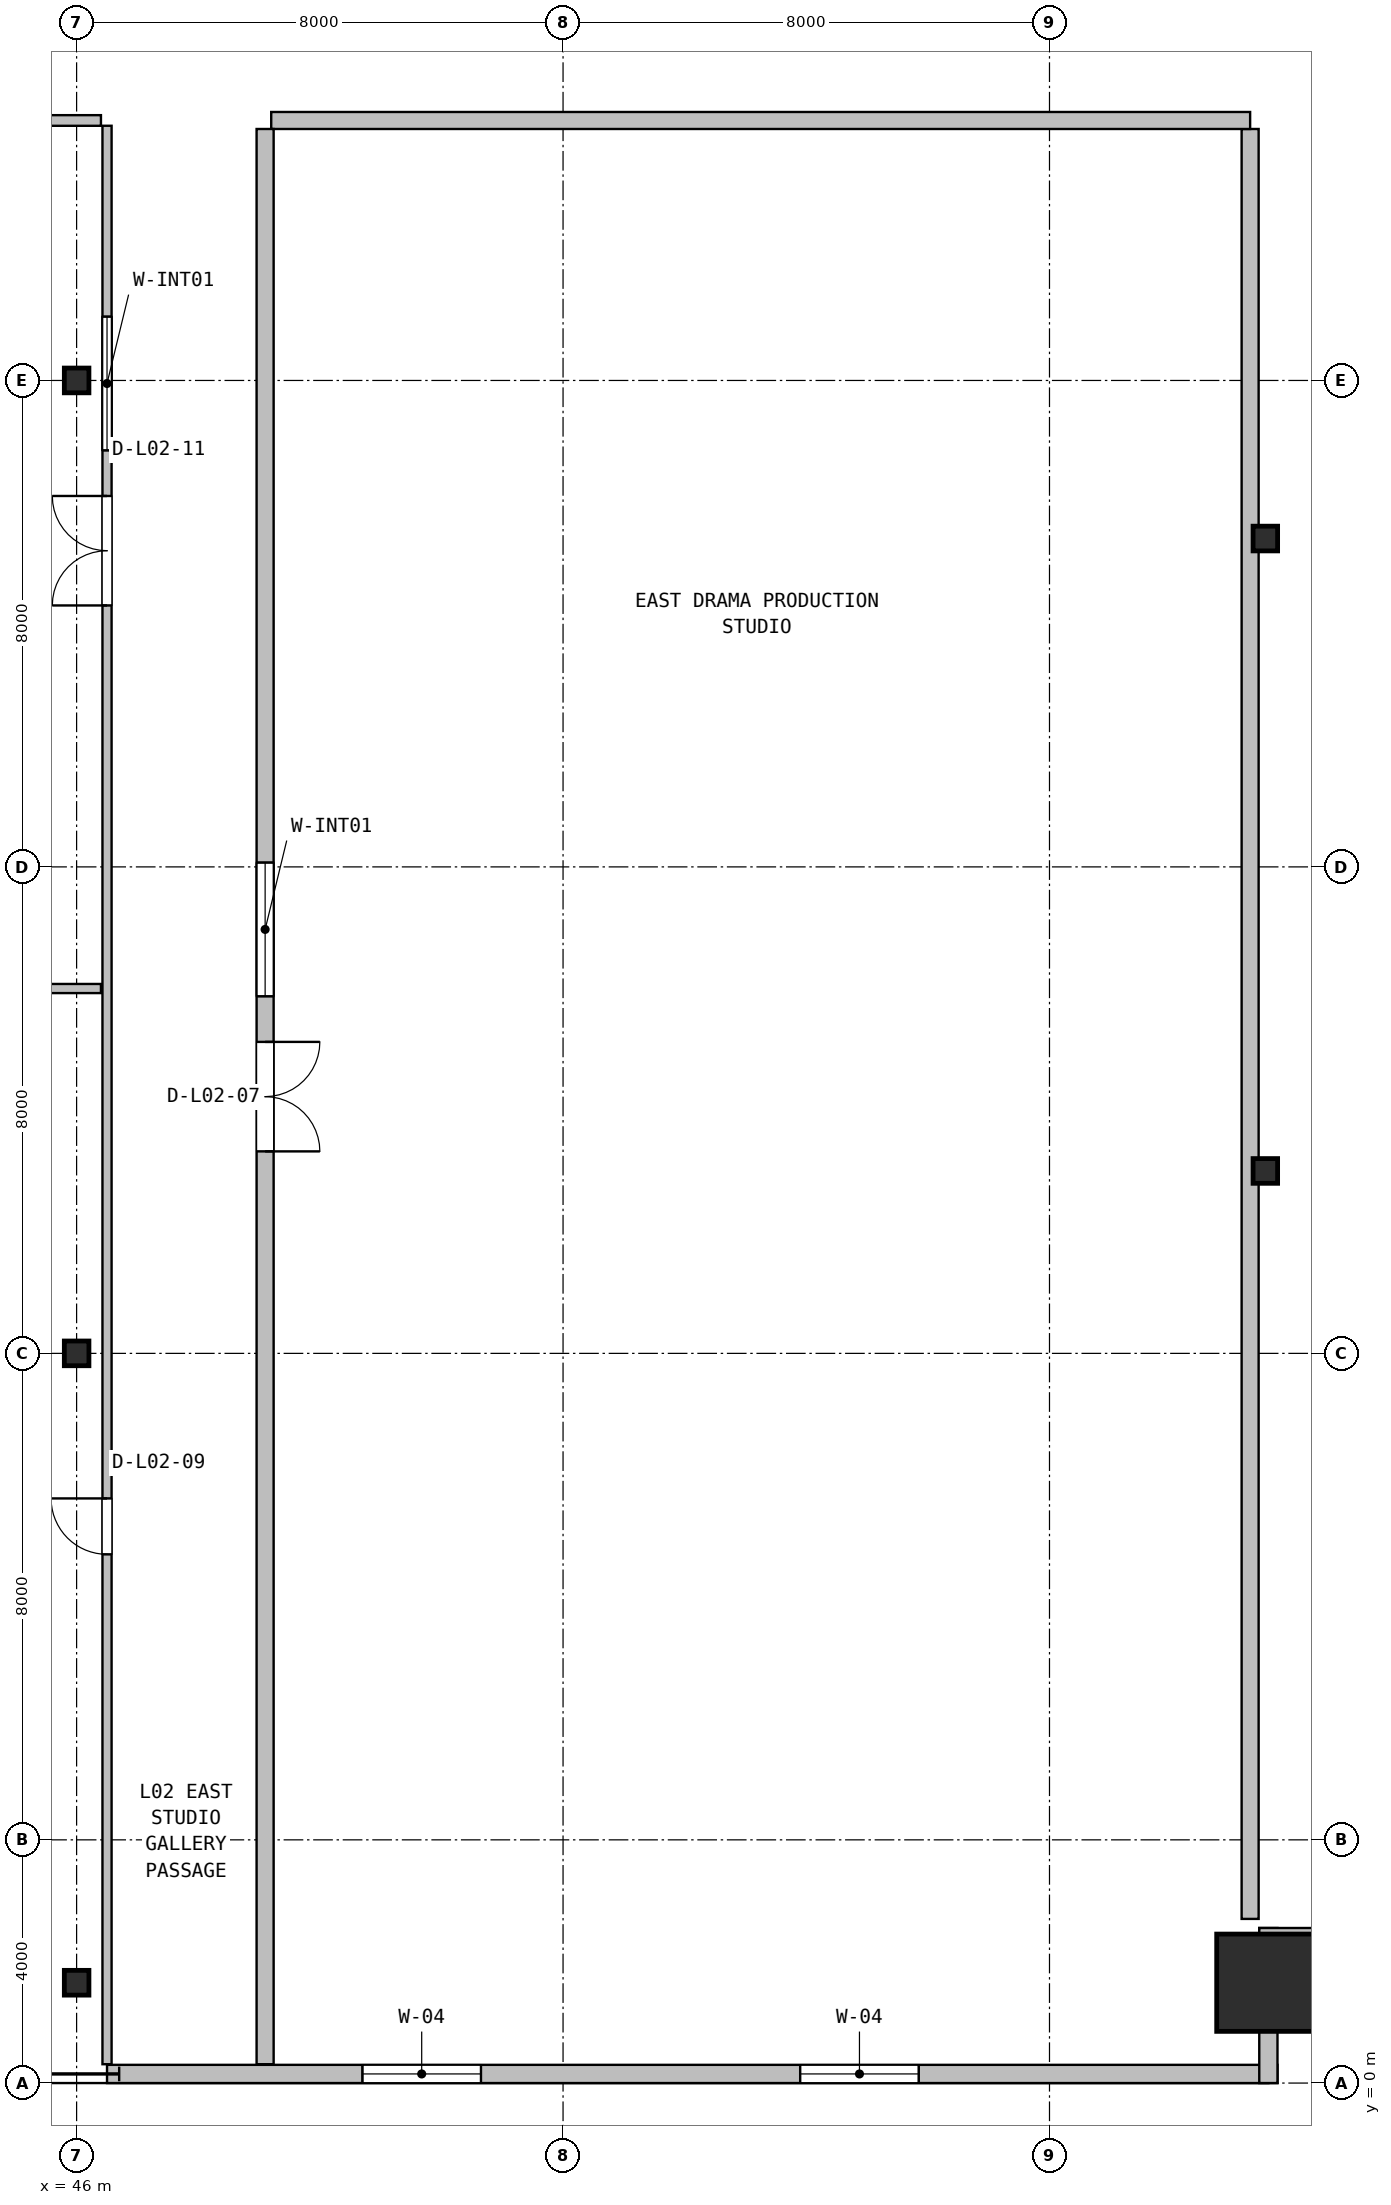
"""IFC4 building model, lengths in metres.
Left out: names, types, materials, properties, quantities, classifications, styles, units other than length and angle.
Written with IfcOpenShell. Run it as: python <this file> out.ifc"""

import sys

from ifc_helpers import new_model, si_unit, direction, frame, frame_2d, origin, origin_2d, place, context, subcontext, project, spatial, rectangle, hollow_rectangle, i_section, extrude, source, transform, mapped, element, fill, save


model = new_model("IFC4")
c1 = context("Model", 3, precision=1e-05, world=origin(), true_north=direction((0.0, 1.0)))
c2 = subcontext(c1, "Body", "Model", "MODEL_VIEW")
j1 = project(units=[si_unit("LENGTHUNIT", "METRE"), si_unit("PLANEANGLEUNIT", "RADIAN")], contexts=[c1])
p1 = place(None, origin())
s1 = spatial("IfcSite", under=j1, at=p1, CompositionType="ELEMENT")
p2 = place(p1, origin())
s2 = spatial("IfcBuilding", under=s1, at=p2, CompositionType="ELEMENT")
p3 = place(p2, frame((0.0, 0.0, 11.4)))
s3 = spatial("IfcBuildingStorey", under=s2, at=p3, CompositionType="ELEMENT", Elevation=11.4)
m1 = source(origin(), c2, "Body", "SweptSolid", [
    extrude(hollow_rectangle(XDim=1.6, YDim=1.6, WallThickness=0.06, at=origin_2d()), origin(), (0.0, 0.0, 1.0), 5.4),
])
p4 = place(p3, frame((65.55, 1.65, 0.0), z_axis=(0.0, 0.0, 1.0), x_axis=(1.0, 0.0, 0.0)))
e1 = element("IfcColumn", 1, at=p4, inside=s3, PredefinedType="COLUMN", context=c2, shape_type="MappedRepresentation", body=[
    mapped(m1, transform((0.0, 0.0, 0.0), x_axis=(1.0, 0.0, 0.0), y_axis=(0.0, 1.0, 0.0), z_axis=(0.0, 0.0, 1.0), scale=1.0)),
])
m2 = source(origin(), c2, "Body", "SweptSolid", [
    extrude(i_section(OverallWidth=0.404, OverallDepth=0.407, WebThickness=0.027, FlangeThickness=0.044, FilletRadius=0.018, at=origin_2d()), origin(), (0.0, 0.0, 1.0), 5.4),
])
for number, where, z_axis, x_axis in (
    (2, (46.0, 1.65, 0.0), (0.0, 0.0, 1.0), (1.0, 0.0, 0.0)),
    (3, (46.0, 12.0, 0.0), (0.0, 0.0, 1.0), (1.0, 0.0, 0.0)),
    (4, (46.0, 28.0, 0.0), (0.0, 0.0, 1.0), (1.0, 0.0, 0.0)),
    (5, (65.55, 15.0, 0.0), (0.0, 0.0, 1.0), (1.0, 0.0, 0.0)),
    (6, (65.55, 25.4, 0.0), (0.0, 0.0, 1.0), (1.0, 0.0, 0.0)),
):
    element("IfcColumn", number, at=place(p3, frame(where, z_axis=z_axis, x_axis=x_axis)), inside=s3, PredefinedType="COLUMN", context=c2, shape_type="MappedRepresentation", body=[
        mapped(m2, transform((0.0, 0.0, 0.0), x_axis=(1.0, 0.0, 0.0), y_axis=(0.0, 1.0, 0.0), z_axis=(0.0, 0.0, 1.0), scale=1.0)),
    ])
p5 = place(p3, frame((46.5, 0.15, 0.0), z_axis=(0.0, 0.0, 1.0), x_axis=(1.0, 0.0, 0.0)))
e7 = element("IfcWall", 7, at=p5, inside=s3, PredefinedType="SOLIDWALL", context=c2, shape_type="SweptSolid", body=[
    extrude(rectangle(XDim=19.25, YDim=0.3, at=frame_2d((9.625, 0.0))), origin(), (0.0, 0.0, 1.0), 5.1),
])
p6 = place(p5, frame((4.2, 0.0, 0.9)))
e8 = element("IfcOpeningElement", 8, at=p6, cuts=e7, PredefinedType="OPENING", context=c2, shape_type="SweptSolid", body=[
    extrude(rectangle(XDim=1.95, YDim=1.95, at=frame_2d((0.975, 0.975))), frame((0.0, 0.16, 0.0), z_axis=(0.0, -1.0, 0.0), x_axis=(1.0, 0.0, 0.0)), (0.0, 0.0, 1.0), 0.32),
])
p7 = place(p5, frame((11.4, 0.0, 0.9)))
e9 = element("IfcOpeningElement", 9, at=p7, cuts=e7, PredefinedType="OPENING", context=c2, shape_type="SweptSolid", body=[
    extrude(rectangle(XDim=1.95, YDim=1.95, at=frame_2d((0.975, 0.975))), frame((0.0, 0.16, 0.0), z_axis=(0.0, -1.0, 0.0), x_axis=(1.0, 0.0, 0.0)), (0.0, 0.0, 1.0), 0.32),
])
for number, where, z_axis, x_axis in (
    (10, (65.6, 0.0, 0.0), (0.0, 0.0, 1.0), (0.0, 1.0, 0.0)),
    (11, (65.45, 2.4, 0.0), (0.0, 0.0, 1.0), (1.0, 0.0, 0.0)),
):
    element("IfcWall", number, at=place(p3, frame(where, z_axis=z_axis, x_axis=x_axis)), inside=s3, PredefinedType="SOLIDWALL", context=c2, shape_type="SweptSolid", body=[
        extrude(rectangle(XDim=2.55, YDim=0.3, at=frame_2d((1.275, 0.0))), origin(), (0.0, 0.0, 1.0), 4.183),
    ])
p8 = place(p3, frame((65.3, 2.7, 0.0), z_axis=(0.0, 0.0, 1.0), x_axis=(0.0, 1.0, 0.0)))
e12 = element("IfcWall", 12, at=p8, inside=s3, PredefinedType="SOLIDWALL", context=c2, shape_type="SweptSolid", body=[
    extrude(rectangle(XDim=29.435, YDim=0.28, at=frame_2d((14.718, 0.0))), origin(), (0.0, 0.0, 1.0), 4.183),
])
p9 = place(p3, frame((49.2, 32.275, 0.0), z_axis=(0.0, 0.0, 1.0), x_axis=(1.0, 0.0, 0.0)))
e13 = element("IfcWall", 13, at=p9, inside=s3, PredefinedType="SOLIDWALL", context=c2, shape_type="SweptSolid", body=[
    extrude(rectangle(XDim=16.1, YDim=0.28, at=frame_2d((8.05, 0.0))), origin(), (0.0, 0.0, 1.0), 5.1),
])
p10 = place(p3, frame((49.1, 0.31, 0.0), z_axis=(0.0, 0.0, 1.0), x_axis=(0.0, 1.0, 0.0)))
e14 = element("IfcWall", 14, at=p10, inside=s3, PredefinedType="SOLIDWALL", context=c2, shape_type="SweptSolid", body=[
    extrude(rectangle(XDim=31.825, YDim=0.28, at=frame_2d((15.913, 0.0))), origin(), (0.0, 0.0, 1.0), 4.183),
])
p11 = place(p10, frame((15.012, 0.0, 0.0)))
e15 = element("IfcOpeningElement", 15, at=p11, cuts=e14, PredefinedType="OPENING", context=c2, shape_type="SweptSolid", body=[
    extrude(rectangle(XDim=1.8, YDim=2.25, at=frame_2d((0.9, 1.125))), frame((0.0, 0.15, 0.0), z_axis=(0.0, -1.0, 0.0), x_axis=(1.0, 0.0, 0.0)), (0.0, 0.0, 1.0), 0.3),
])
p12 = place(p10, frame((17.562, 0.0, 0.95)))
e16 = element("IfcOpeningElement", 16, at=p12, cuts=e14, PredefinedType="OPENING", context=c2, shape_type="SweptSolid", body=[
    extrude(rectangle(XDim=2.2, YDim=1.3, at=frame_2d((1.1, 0.65))), frame((0.0, 0.15, 0.0), z_axis=(0.0, -1.0, 0.0), x_axis=(1.0, 0.0, 0.0)), (0.0, 0.0, 1.0), 0.3),
])
p13 = place(p3, frame((21.6, 18.0, 0.0), z_axis=(0.0, 0.0, 1.0), x_axis=(1.0, 0.0, 0.0)))
e17 = element("IfcWall", 17, at=p13, inside=s3, PredefinedType="PARTITIONING", context=c2, shape_type="SweptSolid", body=[
    extrude(rectangle(XDim=24.8, YDim=0.15, at=frame_2d((12.4, 0.0))), origin(), (0.0, 0.0, 1.0), 4.183),
])
p14 = place(p3, frame((46.5, 0.31, 0.0), z_axis=(0.0, 0.0, 1.0), x_axis=(0.0, 1.0, 0.0)))
e18 = element("IfcWall", 18, at=p14, inside=s3, PredefinedType="PARTITIONING", context=c2, shape_type="SweptSolid", body=[
    extrude(rectangle(XDim=31.878, YDim=0.15, at=frame_2d((15.939, 0.0))), origin(), (0.0, 0.0, 1.0), 4.183),
])
p15 = place(p14, frame((8.385, 0.0, 0.0)))
e19 = element("IfcOpeningElement", 19, at=p15, cuts=e18, PredefinedType="OPENING", context=c2, shape_type="SweptSolid", body=[
    extrude(rectangle(XDim=0.92, YDim=2.08, at=frame_2d((0.46, 1.04))), frame((0.0, 0.085, 0.0), z_axis=(0.0, -1.0, 0.0), x_axis=(1.0, 0.0, 0.0)), (0.0, 0.0, 1.0), 0.17),
])
p16 = place(p14, frame((23.99, 0.0, 0.0)))
e20 = element("IfcOpeningElement", 20, at=p16, cuts=e18, PredefinedType="OPENING", context=c2, shape_type="SweptSolid", body=[
    extrude(rectangle(XDim=1.8, YDim=2.25, at=frame_2d((0.9, 1.125))), frame((0.0, 0.085, 0.0), z_axis=(0.0, -1.0, 0.0), x_axis=(1.0, 0.0, 0.0)), (0.0, 0.0, 1.0), 0.17),
])
p17 = place(p14, frame((26.54, 0.0, 0.95)))
e21 = element("IfcOpeningElement", 21, at=p17, cuts=e18, PredefinedType="OPENING", context=c2, shape_type="SweptSolid", body=[
    extrude(rectangle(XDim=2.2, YDim=1.3, at=frame_2d((1.1, 0.65))), frame((0.0, 0.085, 0.0), z_axis=(0.0, -1.0, 0.0), x_axis=(1.0, 0.0, 0.0)), (0.0, 0.0, 1.0), 0.17),
])
p18 = place(p3, frame((21.6, 32.275, 0.0), z_axis=(0.0, 0.0, 1.0), x_axis=(1.0, 0.0, 0.0)))
e22 = element("IfcWall", 22, at=p18, inside=s3, PredefinedType="PARTITIONING", context=c2, shape_type="SweptSolid", body=[
    extrude(rectangle(XDim=24.8, YDim=0.175, at=frame_2d((12.4, 0.0))), origin(), (0.0, 0.0, 1.0), 4.183),
])
p19 = place(p18, frame((6.775, 0.0, 0.0)))
e23 = element("IfcOpeningElement", 23, at=p19, cuts=e22, PredefinedType="OPENING", context=c2, shape_type="SweptSolid", body=[
    extrude(rectangle(XDim=1.05, YDim=2.1, at=frame_2d((0.525, 1.05))), frame((0.0, 0.098, 0.0), z_axis=(0.0, -1.0, 0.0), x_axis=(1.0, 0.0, 0.0)), (0.0, 0.0, 1.0), 0.195),
])
m3 = source(origin(), c2, "Body", "SweptSolid", [
    extrude(rectangle(XDim=1.95, YDim=1.95, at=frame_2d((0.975, 0.975))), frame((0.0, 0.03, 0.0), z_axis=(0.0, -1.0, 0.0), x_axis=(1.0, 0.0, 0.0)), (0.0, 0.0, 1.0), 0.06),
])
p20 = place(p6, origin())
e24 = element("IfcWindow", 24, at=p20, inside=s3, PartitioningType="SINGLE_PANEL", PredefinedType="WINDOW", context=c2, shape_type="MappedRepresentation", body=[
    mapped(m3, transform((0.0, 0.0, 0.0), x_axis=(1.0, 0.0, 0.0), y_axis=(0.0, 1.0, 0.0), z_axis=(0.0, 0.0, 1.0), scale=1.0)),
])
fill(e8, e24)
p21 = place(p7, origin())
e25 = element("IfcWindow", 25, at=p21, inside=s3, PartitioningType="SINGLE_PANEL", PredefinedType="WINDOW", context=c2, shape_type="MappedRepresentation", body=[
    mapped(m3, transform((0.0, 0.0, 0.0), x_axis=(1.0, 0.0, 0.0), y_axis=(0.0, 1.0, 0.0), z_axis=(0.0, 0.0, 1.0), scale=1.0)),
])
fill(e9, e25)
m4 = source(origin(), c2, "Body", "SweptSolid", [
    extrude(rectangle(XDim=1.8, YDim=2.25, at=frame_2d((0.9, 1.125))), frame((0.0, 0.025, 0.0), z_axis=(0.0, -1.0, 0.0), x_axis=(1.0, 0.0, 0.0)), (0.0, 0.0, 1.0), 0.05),
])
p22 = place(p11, frame((1.8, 0.0, 0.0), z_axis=(0.0, 0.0, 1.0), x_axis=(-1.0, 0.0, 0.0)))
e26 = element("IfcDoor", 26, at=p22, inside=s3, OperationType="DOUBLE_DOOR_SINGLE_SWING", PredefinedType="DOOR", context=c2, shape_type="MappedRepresentation", body=[
    mapped(m4, transform((0.0, 0.0, 0.0), x_axis=(1.0, 0.0, 0.0), y_axis=(0.0, 1.0, 0.0), z_axis=(0.0, 0.0, 1.0), scale=1.0)),
])
fill(e15, e26)
m5 = source(origin(), c2, "Body", "SweptSolid", [
    extrude(rectangle(XDim=2.2, YDim=1.3, at=frame_2d((1.1, 0.65))), frame((0.0, 0.03, 0.0), z_axis=(0.0, -1.0, 0.0), x_axis=(1.0, 0.0, 0.0)), (0.0, 0.0, 1.0), 0.06),
])
p23 = place(p12, origin())
e27 = element("IfcWindow", 27, at=p23, inside=s3, PartitioningType="SINGLE_PANEL", PredefinedType="WINDOW", context=c2, shape_type="MappedRepresentation", body=[
    mapped(m5, transform((0.0, 0.0, 0.0), x_axis=(1.0, 0.0, 0.0), y_axis=(0.0, 1.0, 0.0), z_axis=(0.0, 0.0, 1.0), scale=1.0)),
])
fill(e16, e27)
m6 = source(origin(), c2, "Body", "SweptSolid", [
    extrude(rectangle(XDim=0.92, YDim=2.08, at=frame_2d((0.46, 1.04))), frame((0.0, 0.025, 0.0), z_axis=(0.0, -1.0, 0.0), x_axis=(1.0, 0.0, 0.0)), (0.0, 0.0, 1.0), 0.05),
])
p24 = place(p15, origin())
e28 = element("IfcDoor", 28, at=p24, inside=s3, OperationType="SINGLE_SWING_RIGHT", PredefinedType="DOOR", context=c2, shape_type="MappedRepresentation", body=[
    mapped(m6, transform((0.0, 0.0, 0.0), x_axis=(1.0, 0.0, 0.0), y_axis=(0.0, 1.0, 0.0), z_axis=(0.0, 0.0, 1.0), scale=1.0)),
])
fill(e19, e28)
p25 = place(p16, origin())
e29 = element("IfcDoor", 29, at=p25, inside=s3, OperationType="DOUBLE_DOOR_SINGLE_SWING", PredefinedType="DOOR", context=c2, shape_type="MappedRepresentation", body=[
    mapped(m4, transform((0.0, 0.0, 0.0), x_axis=(1.0, 0.0, 0.0), y_axis=(0.0, 1.0, 0.0), z_axis=(0.0, 0.0, 1.0), scale=1.0)),
])
fill(e20, e29)
p26 = place(p17, origin())
e30 = element("IfcWindow", 30, at=p26, inside=s3, PartitioningType="SINGLE_PANEL", PredefinedType="WINDOW", context=c2, shape_type="MappedRepresentation", body=[
    mapped(m5, transform((0.0, 0.0, 0.0), x_axis=(1.0, 0.0, 0.0), y_axis=(0.0, 1.0, 0.0), z_axis=(0.0, 0.0, 1.0), scale=1.0)),
])
fill(e21, e30)
save(model, sys.argv[1])
